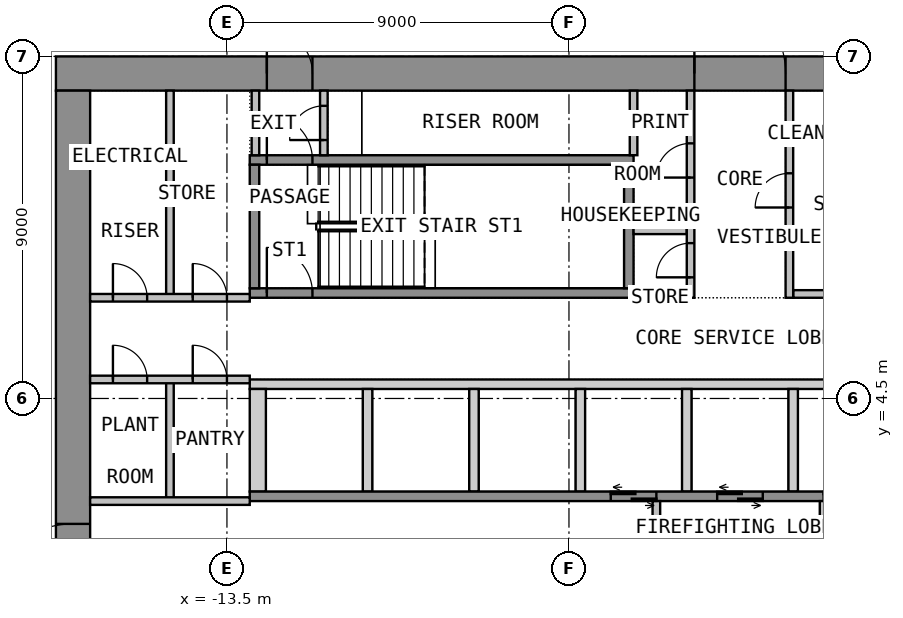
"""IFC4 building model, lengths in metres.
Left out: names, types, materials, properties, quantities, classifications, styles, units other than length and angle.
Written with IfcOpenShell. Run it as: python <this file> out.ifc"""

import sys

from ifc_helpers import new_model, si_unit, direction, frame, frame_2d, origin, place, context, subcontext, project, spatial, polyline, rectangle, outline, extrude, element, fill, save


model = new_model("IFC4")
c1 = context("Model", 3, precision=1e-05, world=origin(), true_north=direction((0.0, 1.0)))
c2 = subcontext(c1, "Body", "Model", "MODEL_VIEW")
j1 = project(units=[si_unit("LENGTHUNIT", "METRE"), si_unit("PLANEANGLEUNIT", "RADIAN")], contexts=[c1])
p1 = place(None, origin())
s1 = spatial("IfcSite", under=j1, at=p1, CompositionType="ELEMENT")
p2 = place(p1, origin())
s2 = spatial("IfcBuilding", under=s1, at=p2, CompositionType="ELEMENT")
p3 = place(p2, frame((0.0, 0.0, 81.3)))
s3 = spatial("IfcBuildingStorey", under=s2, at=p3, CompositionType="ELEMENT", Elevation=81.3)
p4 = place(p3, frame((-18.0, 13.05, 0.0), z_axis=(0.0, 0.0, 1.0), x_axis=(1.0, 0.0, 0.0)))
e1 = element("IfcWall", 1, at=p4, inside=s3, PredefinedType="SHEAR", context=c2, shape_type="SweptSolid", body=[
    extrude(rectangle(XDim=36.0, YDim=0.9, at=frame_2d((18.0, 0.0))), origin(), (0.0, 0.0, 1.0), 3.525),
])
p5 = place(p4, frame((16.8, 0.0, 0.0)))
e2 = element("IfcOpeningElement", 2, at=p5, cuts=e1, PredefinedType="OPENING", context=c2, shape_type="SweptSolid", body=[
    extrude(rectangle(XDim=2.4, YDim=2.1, at=frame_2d((1.2, 1.05))), frame((0.0, 0.46, 0.0), z_axis=(0.0, -1.0, 0.0), x_axis=(1.0, 0.0, 0.0)), (0.0, 0.0, 1.0), 0.92),
])
p6 = place(p4, frame((5.55, 0.0, 0.0)))
e3 = element("IfcOpeningElement", 3, at=p6, cuts=e1, PredefinedType="OPENING", context=c2, shape_type="SweptSolid", body=[
    extrude(rectangle(XDim=1.2, YDim=2.1, at=frame_2d((0.6, 1.05))), frame((0.0, 0.46, 0.0), z_axis=(0.0, -1.0, 0.0), x_axis=(1.0, 0.0, 0.0)), (0.0, 0.0, 1.0), 0.92),
])
p7 = place(p4, frame((29.25, 0.0, 0.0)))
e4 = element("IfcOpeningElement", 4, at=p7, cuts=e1, PredefinedType="OPENING", context=c2, shape_type="SweptSolid", body=[
    extrude(rectangle(XDim=1.2, YDim=2.1, at=frame_2d((0.6, 1.05))), frame((0.0, 0.46, 0.0), z_axis=(0.0, -1.0, 0.0), x_axis=(1.0, 0.0, 0.0)), (0.0, 0.0, 1.0), 0.92),
])
p8 = place(p3, frame((-17.55, -12.6, 0.0), z_axis=(0.0, 0.0, 1.0), x_axis=(0.0, 1.0, 0.0)))
e5 = element("IfcWall", 5, at=p8, inside=s3, PredefinedType="SHEAR", context=c2, shape_type="SweptSolid", body=[
    extrude(rectangle(XDim=25.2, YDim=0.9, at=frame_2d((12.6, 0.0))), origin(), (0.0, 0.0, 1.0), 3.525),
])
p9 = place(p8, frame((11.4, 0.0, 0.0)))
e6 = element("IfcOpeningElement", 6, at=p9, cuts=e5, PredefinedType="OPENING", context=c2, shape_type="SweptSolid", body=[
    extrude(rectangle(XDim=2.4, YDim=2.1, at=frame_2d((1.2, 1.05))), frame((0.0, 0.46, 0.0), z_axis=(0.0, -1.0, 0.0), x_axis=(1.0, 0.0, 0.0)), (0.0, 0.0, 1.0), 0.92),
])
p10 = place(p3, origin())
e7 = element("IfcWall", 7, at=p10, inside=s3, PredefinedType="SHEAR", context=c2, shape_type="SweptSolid", body=[
    extrude(outline(polyline([(-12.9, 4.75), (12.9, 4.75), (12.9, 5.0), (-12.9, 5.0), (-12.9, 4.75)])), origin(), (0.0, 0.0, 1.0), 3.525),
])
p11 = place(p3, origin())
e8 = element("IfcWall", 8, at=p11, inside=s3, PredefinedType="SHEAR", context=c2, shape_type="SweptSolid", body=[
    extrude(outline(polyline([(-12.9, 2.05), (-12.475, 2.05), (-12.475, 4.75), (-12.9, 4.75), (-12.9, 2.05)])), origin(), (0.0, 0.0, 1.0), 3.525),
])
p12 = place(p3, origin())
e9 = element("IfcWall", 9, at=p12, inside=s3, PredefinedType="SHEAR", context=c2, shape_type="SweptSolid", body=[
    extrude(outline(polyline([(-9.925, 2.05), (-9.675, 2.05), (-9.675, 4.75), (-9.925, 4.75), (-9.925, 2.05)])), origin(), (0.0, 0.0, 1.0), 3.525),
])
p13 = place(p3, origin())
e10 = element("IfcWall", 10, at=p13, inside=s3, PredefinedType="SHEAR", context=c2, shape_type="SweptSolid", body=[
    extrude(outline(polyline([(-7.125, 2.05), (-6.875, 2.05), (-6.875, 4.75), (-7.125, 4.75), (-7.125, 2.05)])), origin(), (0.0, 0.0, 1.0), 3.525),
])
p14 = place(p3, origin())
e11 = element("IfcWall", 11, at=p14, inside=s3, PredefinedType="SHEAR", context=c2, shape_type="SweptSolid", body=[
    extrude(outline(polyline([(-4.325, 2.05), (-4.075, 2.05), (-4.075, 4.75), (-4.325, 4.75), (-4.325, 2.05)])), origin(), (0.0, 0.0, 1.0), 3.525),
])
p15 = place(p3, origin())
e12 = element("IfcWall", 12, at=p15, inside=s3, PredefinedType="SHEAR", context=c2, shape_type="SweptSolid", body=[
    extrude(outline(polyline([(-1.525, 2.05), (-1.275, 2.05), (-1.275, 4.75), (-1.525, 4.75), (-1.525, 2.05)])), origin(), (0.0, 0.0, 1.0), 3.525),
])
p16 = place(p3, origin())
e13 = element("IfcWall", 13, at=p16, inside=s3, PredefinedType="SHEAR", context=c2, shape_type="SweptSolid", body=[
    extrude(outline(polyline([(1.275, 2.05), (1.525, 2.05), (1.525, 4.75), (1.275, 4.75), (1.275, 2.05)])), origin(), (0.0, 0.0, 1.0), 3.525),
])
p17 = place(p3, frame((-12.9, 1.925, 0.0), z_axis=(0.0, 0.0, 1.0), x_axis=(1.0, 0.0, 0.0)))
e14 = element("IfcWall", 14, at=p17, inside=s3, PredefinedType="SHEAR", context=c2, shape_type="SweptSolid", body=[
    extrude(rectangle(XDim=25.8, YDim=0.25, at=frame_2d((12.9, 0.0))), origin(), (0.0, 0.0, 1.0), 3.525),
])
p18 = place(p17, frame((9.5, 0.0, 0.0)))
e15 = element("IfcOpeningElement", 15, at=p18, cuts=e14, PredefinedType="OPENING", context=c2, shape_type="SweptSolid", body=[
    extrude(rectangle(XDim=1.2, YDim=2.1, at=frame_2d((0.6, 1.05))), frame((0.0, 0.135, 0.0), z_axis=(0.0, -1.0, 0.0), x_axis=(1.0, 0.0, 0.0)), (0.0, 0.0, 1.0), 0.27),
])
p19 = place(p17, frame((12.3, 0.0, 0.0)))
e16 = element("IfcOpeningElement", 16, at=p19, cuts=e14, PredefinedType="OPENING", context=c2, shape_type="SweptSolid", body=[
    extrude(rectangle(XDim=1.2, YDim=2.1, at=frame_2d((0.6, 1.05))), frame((0.0, 0.135, 0.0), z_axis=(0.0, -1.0, 0.0), x_axis=(1.0, 0.0, 0.0)), (0.0, 0.0, 1.0), 0.27),
])
p20 = place(p17, frame((15.1, 0.0, 0.0)))
e17 = element("IfcOpeningElement", 17, at=p20, cuts=e14, PredefinedType="OPENING", context=c2, shape_type="SweptSolid", body=[
    extrude(rectangle(XDim=1.2, YDim=2.1, at=frame_2d((0.6, 1.05))), frame((0.0, 0.135, 0.0), z_axis=(0.0, -1.0, 0.0), x_axis=(1.0, 0.0, 0.0)), (0.0, 0.0, 1.0), 0.27),
])
p21 = place(p17, frame((17.9, 0.0, 0.0)))
e18 = element("IfcOpeningElement", 18, at=p21, cuts=e14, PredefinedType="OPENING", context=c2, shape_type="SweptSolid", body=[
    extrude(rectangle(XDim=1.2, YDim=2.1, at=frame_2d((0.6, 1.05))), frame((0.0, 0.135, 0.0), z_axis=(0.0, -1.0, 0.0), x_axis=(1.0, 0.0, 0.0)), (0.0, 0.0, 1.0), 0.27),
])
p22 = place(p17, frame((20.7, 0.0, 0.0)))
e19 = element("IfcOpeningElement", 19, at=p22, cuts=e14, PredefinedType="OPENING", context=c2, shape_type="SweptSolid", body=[
    extrude(rectangle(XDim=1.2, YDim=2.1, at=frame_2d((0.6, 1.05))), frame((0.0, 0.135, 0.0), z_axis=(0.0, -1.0, 0.0), x_axis=(1.0, 0.0, 0.0)), (0.0, 0.0, 1.0), 0.27),
])
p23 = place(p17, frame((23.5, 0.0, 0.0)))
e20 = element("IfcOpeningElement", 20, at=p23, cuts=e14, PredefinedType="OPENING", context=c2, shape_type="SweptSolid", body=[
    extrude(rectangle(XDim=1.2, YDim=2.1, at=frame_2d((0.6, 1.05))), frame((0.0, 0.135, 0.0), z_axis=(0.0, -1.0, 0.0), x_axis=(1.0, 0.0, 0.0)), (0.0, 0.0, 1.0), 0.27),
])
p24 = place(p3, frame((-2.2, -1.8, 0.0), z_axis=(0.0, 0.0, 1.0), x_axis=(0.0, 1.0, 0.0)))
e21 = element("IfcWall", 21, at=p24, inside=s3, PredefinedType="PARTITIONING", context=c2, shape_type="SweptSolid", body=[
    extrude(rectangle(XDim=3.6, YDim=0.2, at=frame_2d((1.8, 0.0))), origin(), (0.0, 0.0, 1.0), 3.525),
])
p25 = place(p24, frame((1.2, 0.0, 0.0)))
e22 = element("IfcOpeningElement", 22, at=p25, cuts=e21, PredefinedType="OPENING", context=c2, shape_type="SweptSolid", body=[
    extrude(rectangle(XDim=1.2, YDim=2.1, at=frame_2d((0.6, 1.05))), frame((0.0, 0.11, 0.0), z_axis=(0.0, -1.0, 0.0), x_axis=(1.0, 0.0, 0.0)), (0.0, 0.0, 1.0), 0.22),
])
p26 = place(p3, frame((2.2, -1.8, 0.0), z_axis=(0.0, 0.0, 1.0), x_axis=(0.0, 1.0, 0.0)))
e23 = element("IfcWall", 23, at=p26, inside=s3, PredefinedType="PARTITIONING", context=c2, shape_type="SweptSolid", body=[
    extrude(rectangle(XDim=3.6, YDim=0.2, at=frame_2d((1.8, 0.0))), origin(), (0.0, 0.0, 1.0), 3.525),
])
p27 = place(p26, frame((1.2, 0.0, 0.0)))
e24 = element("IfcOpeningElement", 24, at=p27, cuts=e23, PredefinedType="OPENING", context=c2, shape_type="SweptSolid", body=[
    extrude(rectangle(XDim=1.2, YDim=2.1, at=frame_2d((0.6, 1.05))), frame((0.0, 0.11, 0.0), z_axis=(0.0, -1.0, 0.0), x_axis=(1.0, 0.0, 0.0)), (0.0, 0.0, 1.0), 0.22),
])
p28 = place(p3, frame((-12.9, 7.275, 0.0), z_axis=(0.0, 0.0, 1.0), x_axis=(1.0, 0.0, 0.0)))
e25 = element("IfcWall", 25, at=p28, inside=s3, PredefinedType="SHEAR", context=c2, shape_type="SweptSolid", body=[
    extrude(rectangle(XDim=10.1, YDim=0.25, at=frame_2d((5.05, 0.0))), origin(), (0.0, 0.0, 1.0), 3.525),
])
p29 = place(p28, frame((0.45, 0.0, 0.0)))
e26 = element("IfcOpeningElement", 26, at=p29, cuts=e25, PredefinedType="OPENING", context=c2, shape_type="SweptSolid", body=[
    extrude(rectangle(XDim=1.2, YDim=2.1, at=frame_2d((0.6, 1.05))), frame((0.0, 0.135, 0.0), z_axis=(0.0, -1.0, 0.0), x_axis=(1.0, 0.0, 0.0)), (0.0, 0.0, 1.0), 0.27),
])
p30 = place(p3, frame((-12.9, 10.775, 0.0), z_axis=(0.0, 0.0, 1.0), x_axis=(1.0, 0.0, 0.0)))
e27 = element("IfcWall", 27, at=p30, inside=s3, PredefinedType="SHEAR", context=c2, shape_type="SweptSolid", body=[
    extrude(rectangle(XDim=10.1, YDim=0.25, at=frame_2d((5.05, 0.0))), origin(), (0.0, 0.0, 1.0), 3.525),
])
p31 = place(p30, frame((0.45, 0.0, 0.0)))
e28 = element("IfcOpeningElement", 28, at=p31, cuts=e27, PredefinedType="OPENING", context=c2, shape_type="SweptSolid", body=[
    extrude(rectangle(XDim=1.2, YDim=2.1, at=frame_2d((0.6, 1.05))), frame((0.0, 0.135, 0.0), z_axis=(0.0, -1.0, 0.0), x_axis=(1.0, 0.0, 0.0)), (0.0, 0.0, 1.0), 0.27),
])
for number, where, z_axis, x_axis in (
    (29, (-12.775, 7.4, 0.0), (0.0, 0.0, 1.0), (0.0, 1.0, 0.0)),
    (30, (-2.925, 7.4, 0.0), (0.0, 0.0, 1.0), (0.0, 1.0, 0.0)),
):
    element("IfcWall", number, at=place(p3, frame(where, z_axis=z_axis, x_axis=x_axis)), inside=s3, PredefinedType="SHEAR", context=c2, shape_type="SweptSolid", body=[
        extrude(rectangle(XDim=3.25, YDim=0.25, at=frame_2d((1.625, 0.0))), origin(), (0.0, 0.0, 1.0), 3.525),
    ])
for number, where, z_axis, x_axis in (
    (31, (-2.8, 7.25, 0.0), (0.0, 0.0, 1.0), (1.0, 0.0, 0.0)),
    (32, (-2.8, 8.925, 0.0), (0.0, 0.0, 1.0), (1.0, 0.0, 0.0)),
    (33, (1.4, 7.25, 0.0), (0.0, 0.0, 1.0), (1.0, 0.0, 0.0)),
):
    element("IfcWall", number, at=place(p3, frame(where, z_axis=z_axis, x_axis=x_axis)), inside=s3, PredefinedType="PARTITIONING", context=c2, shape_type="SweptSolid", body=[
        extrude(rectangle(XDim=1.4, YDim=0.2, at=frame_2d((0.7, 0.0))), origin(), (0.0, 0.0, 1.0), 3.525),
    ])
p32 = place(p3, frame((-1.3, 7.15, 0.0), z_axis=(0.0, 0.0, 1.0), x_axis=(0.0, 1.0, 0.0)))
e34 = element("IfcWall", 34, at=p32, inside=s3, PredefinedType="PARTITIONING", context=c2, shape_type="SweptSolid", body=[
    extrude(rectangle(XDim=5.45, YDim=0.2, at=frame_2d((2.725, 0.0))), origin(), (0.0, 0.0, 1.0), 3.525),
])
p33 = place(p32, frame((0.538, 0.0, 0.0)))
e35 = element("IfcOpeningElement", 35, at=p33, cuts=e34, PredefinedType="OPENING", context=c2, shape_type="SweptSolid", body=[
    extrude(rectangle(XDim=0.9, YDim=2.1, at=frame_2d((0.45, 1.05))), frame((0.0, 0.11, 0.0), z_axis=(0.0, -1.0, 0.0), x_axis=(1.0, 0.0, 0.0)), (0.0, 0.0, 1.0), 0.22),
])
p34 = place(p32, frame((3.163, 0.0, 0.0)))
e36 = element("IfcOpeningElement", 36, at=p34, cuts=e34, PredefinedType="OPENING", context=c2, shape_type="SweptSolid", body=[
    extrude(rectangle(XDim=0.9, YDim=2.1, at=frame_2d((0.45, 1.05))), frame((0.0, 0.11, 0.0), z_axis=(0.0, -1.0, 0.0), x_axis=(1.0, 0.0, 0.0)), (0.0, 0.0, 1.0), 0.22),
])
p35 = place(p3, frame((1.3, 7.15, 0.0), z_axis=(0.0, 0.0, 1.0), x_axis=(0.0, 1.0, 0.0)))
e37 = element("IfcWall", 37, at=p35, inside=s3, PredefinedType="PARTITIONING", context=c2, shape_type="SweptSolid", body=[
    extrude(rectangle(XDim=5.45, YDim=0.2, at=frame_2d((2.725, 0.0))), origin(), (0.0, 0.0, 1.0), 3.525),
])
p36 = place(p35, frame((2.375, 0.0, 0.0)))
e38 = element("IfcOpeningElement", 38, at=p36, cuts=e37, PredefinedType="OPENING", context=c2, shape_type="SweptSolid", body=[
    extrude(rectangle(XDim=0.9, YDim=2.1, at=frame_2d((0.45, 1.05))), frame((0.0, 0.11, 0.0), z_axis=(0.0, -1.0, 0.0), x_axis=(1.0, 0.0, 0.0)), (0.0, 0.0, 1.0), 0.22),
])
p37 = place(p3, frame((-12.75, 10.9, 0.0), z_axis=(0.0, 0.0, 1.0), x_axis=(0.0, 1.0, 0.0)))
e39 = element("IfcWall", 39, at=p37, inside=s3, PredefinedType="PARTITIONING", context=c2, shape_type="SweptSolid", body=[
    extrude(rectangle(XDim=1.7, YDim=0.2, at=frame_2d((0.85, 0.0))), origin(), (0.0, 0.0, 1.0), 3.525),
])
p38 = place(p3, frame((-10.95, 10.9, 0.0), z_axis=(0.0, 0.0, 1.0), x_axis=(0.0, 1.0, 0.0)))
e40 = element("IfcWall", 40, at=p38, inside=s3, PredefinedType="PARTITIONING", context=c2, shape_type="SweptSolid", body=[
    extrude(rectangle(XDim=1.7, YDim=0.2, at=frame_2d((0.85, 0.0))), origin(), (0.0, 0.0, 1.0), 3.525),
])
p39 = place(p38, frame((0.4, 0.0, 0.0)))
e41 = element("IfcOpeningElement", 41, at=p39, cuts=e40, PredefinedType="OPENING", context=c2, shape_type="SweptSolid", body=[
    extrude(rectangle(XDim=0.9, YDim=2.1, at=frame_2d((0.45, 1.05))), frame((0.0, 0.11, 0.0), z_axis=(0.0, -1.0, 0.0), x_axis=(1.0, 0.0, 0.0)), (0.0, 0.0, 1.0), 0.22),
])
p40 = place(p3, frame((-15.0, 7.15, 0.0), z_axis=(0.0, 0.0, 1.0), x_axis=(0.0, 1.0, 0.0)))
e42 = element("IfcWall", 42, at=p40, inside=s3, PredefinedType="PARTITIONING", context=c2, shape_type="SweptSolid", body=[
    extrude(rectangle(XDim=5.45, YDim=0.2, at=frame_2d((2.725, 0.0))), origin(), (0.0, 0.0, 1.0), 3.525),
])
p41 = place(p3, frame((-17.1, 7.15, 0.0), z_axis=(0.0, 0.0, 1.0), x_axis=(1.0, 0.0, 0.0)))
e43 = element("IfcWall", 43, at=p41, inside=s3, PredefinedType="PARTITIONING", context=c2, shape_type="SweptSolid", body=[
    extrude(rectangle(XDim=4.2, YDim=0.2, at=frame_2d((2.1, 0.0))), origin(), (0.0, 0.0, 1.0), 3.525),
])
p42 = place(p41, frame((0.6, 0.0, 0.0)))
e44 = element("IfcOpeningElement", 44, at=p42, cuts=e43, PredefinedType="OPENING", context=c2, shape_type="SweptSolid", body=[
    extrude(rectangle(XDim=0.9, YDim=2.1, at=frame_2d((0.45, 1.05))), frame((0.0, 0.11, 0.0), z_axis=(0.0, -1.0, 0.0), x_axis=(1.0, 0.0, 0.0)), (0.0, 0.0, 1.0), 0.22),
])
p43 = place(p41, frame((2.7, 0.0, 0.0)))
e45 = element("IfcOpeningElement", 45, at=p43, cuts=e43, PredefinedType="OPENING", context=c2, shape_type="SweptSolid", body=[
    extrude(rectangle(XDim=0.9, YDim=2.1, at=frame_2d((0.45, 1.05))), frame((0.0, 0.11, 0.0), z_axis=(0.0, -1.0, 0.0), x_axis=(1.0, 0.0, 0.0)), (0.0, 0.0, 1.0), 0.22),
])
p44 = place(p3, frame((-15.0, 1.8, 0.0), z_axis=(0.0, 0.0, 1.0), x_axis=(0.0, 1.0, 0.0)))
e46 = element("IfcWall", 46, at=p44, inside=s3, PredefinedType="PARTITIONING", context=c2, shape_type="SweptSolid", body=[
    extrude(rectangle(XDim=3.2, YDim=0.2, at=frame_2d((1.6, 0.0))), origin(), (0.0, 0.0, 1.0), 3.525),
])
p45 = place(p3, frame((-17.1, 5.0, 0.0), z_axis=(0.0, 0.0, 1.0), x_axis=(1.0, 0.0, 0.0)))
e47 = element("IfcWall", 47, at=p45, inside=s3, PredefinedType="PARTITIONING", context=c2, shape_type="SweptSolid", body=[
    extrude(rectangle(XDim=4.2, YDim=0.2, at=frame_2d((2.1, 0.0))), origin(), (0.0, 0.0, 1.0), 3.525),
])
p46 = place(p45, frame((0.6, 0.0, 0.0)))
e48 = element("IfcOpeningElement", 48, at=p46, cuts=e47, PredefinedType="OPENING", context=c2, shape_type="SweptSolid", body=[
    extrude(rectangle(XDim=0.9, YDim=2.1, at=frame_2d((0.45, 1.05))), frame((0.0, 0.11, 0.0), z_axis=(0.0, -1.0, 0.0), x_axis=(1.0, 0.0, 0.0)), (0.0, 0.0, 1.0), 0.22),
])
p47 = place(p45, frame((2.7, 0.0, 0.0)))
e49 = element("IfcOpeningElement", 49, at=p47, cuts=e47, PredefinedType="OPENING", context=c2, shape_type="SweptSolid", body=[
    extrude(rectangle(XDim=0.9, YDim=2.1, at=frame_2d((0.45, 1.05))), frame((0.0, 0.11, 0.0), z_axis=(0.0, -1.0, 0.0), x_axis=(1.0, 0.0, 0.0)), (0.0, 0.0, 1.0), 0.22),
])
p48 = place(p3, frame((-17.1, 1.8, 0.0), z_axis=(0.0, 0.0, 1.0), x_axis=(1.0, 0.0, 0.0)))
e50 = element("IfcWall", 50, at=p48, inside=s3, PredefinedType="PARTITIONING", context=c2, shape_type="SweptSolid", body=[
    extrude(rectangle(XDim=4.2, YDim=0.2, at=frame_2d((2.1, 0.0))), origin(), (0.0, 0.0, 1.0), 3.525),
])
p49 = place(p3, frame((-2.8, 10.901, 0.0), z_axis=(0.0, 0.0, 1.0), x_axis=(0.0, 1.0, 0.0)))
e51 = element("IfcWall", 51, at=p49, inside=s3, PredefinedType="PARTITIONING", context=c2, shape_type="SweptSolid", body=[
    extrude(rectangle(XDim=1.698, YDim=0.2, at=frame_2d((0.849, 0.0))), origin(), (0.0, 0.0, 1.0), 3.525),
])
p50 = place(p9, origin())
e52 = element("IfcDoor", 52, at=p50, inside=s3, OperationType="DOUBLE_DOOR_DOUBLE_SWING", PredefinedType="DOOR", context=c2, shape_type="SweptSolid", body=[
    extrude(rectangle(XDim=2.4, YDim=2.1, at=frame_2d((1.2, 1.05))), frame((0.0, 0.025, 0.0), z_axis=(0.0, -1.0, 0.0), x_axis=(1.0, 0.0, 0.0)), (0.0, 0.0, 1.0), 0.05),
])
fill(e6, e52)
p51 = place(p5, origin())
e53 = element("IfcDoor", 53, at=p51, inside=s3, OperationType="DOUBLE_DOOR_DOUBLE_SWING", PredefinedType="DOOR", context=c2, shape_type="SweptSolid", body=[
    extrude(rectangle(XDim=2.4, YDim=2.1, at=frame_2d((1.2, 1.05))), frame((0.0, 0.025, 0.0), z_axis=(0.0, -1.0, 0.0), x_axis=(1.0, 0.0, 0.0)), (0.0, 0.0, 1.0), 0.05),
])
fill(e2, e53)
p52 = place(p6, origin())
e54 = element("IfcDoor", 54, at=p52, inside=s3, OperationType="SINGLE_SWING_RIGHT", PredefinedType="DOOR", context=c2, shape_type="SweptSolid", body=[
    extrude(rectangle(XDim=1.2, YDim=2.1, at=frame_2d((0.6, 1.05))), frame((0.0, 0.025, 0.0), z_axis=(0.0, -1.0, 0.0), x_axis=(1.0, 0.0, 0.0)), (0.0, 0.0, 1.0), 0.05),
])
fill(e3, e54)
p53 = place(p18, origin())
e55 = element("IfcDoor", 55, at=p53, inside=s3, OperationType="DOUBLE_DOOR_SLIDING", PredefinedType="DOOR", context=c2, shape_type="SweptSolid", body=[
    extrude(rectangle(XDim=1.2, YDim=2.1, at=frame_2d((0.6, 1.05))), frame((0.0, 0.025, 0.0), z_axis=(0.0, -1.0, 0.0), x_axis=(1.0, 0.0, 0.0)), (0.0, 0.0, 1.0), 0.05),
])
fill(e15, e55)
p54 = place(p19, origin())
e56 = element("IfcDoor", 56, at=p54, inside=s3, OperationType="DOUBLE_DOOR_SLIDING", PredefinedType="DOOR", context=c2, shape_type="SweptSolid", body=[
    extrude(rectangle(XDim=1.2, YDim=2.1, at=frame_2d((0.6, 1.05))), frame((0.0, 0.025, 0.0), z_axis=(0.0, -1.0, 0.0), x_axis=(1.0, 0.0, 0.0)), (0.0, 0.0, 1.0), 0.05),
])
fill(e16, e56)
p55 = place(p29, origin())
e57 = element("IfcDoor", 57, at=p55, inside=s3, OperationType="SINGLE_SWING_LEFT", PredefinedType="DOOR", context=c2, shape_type="SweptSolid", body=[
    extrude(rectangle(XDim=1.2, YDim=2.1, at=frame_2d((0.6, 1.05))), frame((0.0, 0.025, 0.0), z_axis=(0.0, -1.0, 0.0), x_axis=(1.0, 0.0, 0.0)), (0.0, 0.0, 1.0), 0.05),
])
fill(e26, e57)
p56 = place(p33, origin())
e58 = element("IfcDoor", 58, at=p56, inside=s3, OperationType="SINGLE_SWING_LEFT", PredefinedType="DOOR", context=c2, shape_type="SweptSolid", body=[
    extrude(rectangle(XDim=0.9, YDim=2.1, at=frame_2d((0.45, 1.05))), frame((0.0, 0.025, 0.0), z_axis=(0.0, -1.0, 0.0), x_axis=(1.0, 0.0, 0.0)), (0.0, 0.0, 1.0), 0.05),
])
fill(e35, e58)
p57 = place(p34, origin())
e59 = element("IfcDoor", 59, at=p57, inside=s3, OperationType="SINGLE_SWING_LEFT", PredefinedType="DOOR", context=c2, shape_type="SweptSolid", body=[
    extrude(rectangle(XDim=0.9, YDim=2.1, at=frame_2d((0.45, 1.05))), frame((0.0, 0.025, 0.0), z_axis=(0.0, -1.0, 0.0), x_axis=(1.0, 0.0, 0.0)), (0.0, 0.0, 1.0), 0.05),
])
fill(e36, e59)
p58 = place(p36, origin())
e60 = element("IfcDoor", 60, at=p58, inside=s3, OperationType="SINGLE_SWING_LEFT", PredefinedType="DOOR", context=c2, shape_type="SweptSolid", body=[
    extrude(rectangle(XDim=0.9, YDim=2.1, at=frame_2d((0.45, 1.05))), frame((0.0, 0.025, 0.0), z_axis=(0.0, -1.0, 0.0), x_axis=(1.0, 0.0, 0.0)), (0.0, 0.0, 1.0), 0.05),
])
fill(e38, e60)
p59 = place(p31, origin())
e61 = element("IfcDoor", 61, at=p59, inside=s3, OperationType="SINGLE_SWING_RIGHT", PredefinedType="DOOR", context=c2, shape_type="SweptSolid", body=[
    extrude(rectangle(XDim=1.2, YDim=2.1, at=frame_2d((0.6, 1.05))), frame((0.0, 0.025, 0.0), z_axis=(0.0, -1.0, 0.0), x_axis=(1.0, 0.0, 0.0)), (0.0, 0.0, 1.0), 0.05),
])
fill(e28, e61)
p60 = place(p39, origin())
e62 = element("IfcDoor", 62, at=p60, inside=s3, OperationType="SINGLE_SWING_LEFT", PredefinedType="DOOR", context=c2, shape_type="SweptSolid", body=[
    extrude(rectangle(XDim=0.9, YDim=2.1, at=frame_2d((0.45, 1.05))), frame((0.0, 0.025, 0.0), z_axis=(0.0, -1.0, 0.0), x_axis=(1.0, 0.0, 0.0)), (0.0, 0.0, 1.0), 0.05),
])
fill(e41, e62)
p61 = place(p42, origin())
e63 = element("IfcDoor", 63, at=p61, inside=s3, OperationType="SINGLE_SWING_LEFT", PredefinedType="DOOR", context=c2, shape_type="SweptSolid", body=[
    extrude(rectangle(XDim=0.9, YDim=2.1, at=frame_2d((0.45, 1.05))), frame((0.0, 0.025, 0.0), z_axis=(0.0, -1.0, 0.0), x_axis=(1.0, 0.0, 0.0)), (0.0, 0.0, 1.0), 0.05),
])
fill(e44, e63)
p62 = place(p43, origin())
e64 = element("IfcDoor", 64, at=p62, inside=s3, OperationType="SINGLE_SWING_LEFT", PredefinedType="DOOR", context=c2, shape_type="SweptSolid", body=[
    extrude(rectangle(XDim=0.9, YDim=2.1, at=frame_2d((0.45, 1.05))), frame((0.0, 0.025, 0.0), z_axis=(0.0, -1.0, 0.0), x_axis=(1.0, 0.0, 0.0)), (0.0, 0.0, 1.0), 0.05),
])
fill(e45, e64)
p63 = place(p46, origin())
e65 = element("IfcDoor", 65, at=p63, inside=s3, OperationType="SINGLE_SWING_LEFT", PredefinedType="DOOR", context=c2, shape_type="SweptSolid", body=[
    extrude(rectangle(XDim=0.9, YDim=2.1, at=frame_2d((0.45, 1.05))), frame((0.0, 0.025, 0.0), z_axis=(0.0, -1.0, 0.0), x_axis=(1.0, 0.0, 0.0)), (0.0, 0.0, 1.0), 0.05),
])
fill(e48, e65)
p64 = place(p47, origin())
e66 = element("IfcDoor", 66, at=p64, inside=s3, OperationType="SINGLE_SWING_LEFT", PredefinedType="DOOR", context=c2, shape_type="SweptSolid", body=[
    extrude(rectangle(XDim=0.9, YDim=2.1, at=frame_2d((0.45, 1.05))), frame((0.0, 0.025, 0.0), z_axis=(0.0, -1.0, 0.0), x_axis=(1.0, 0.0, 0.0)), (0.0, 0.0, 1.0), 0.05),
])
fill(e49, e66)
save(model, sys.argv[1])
